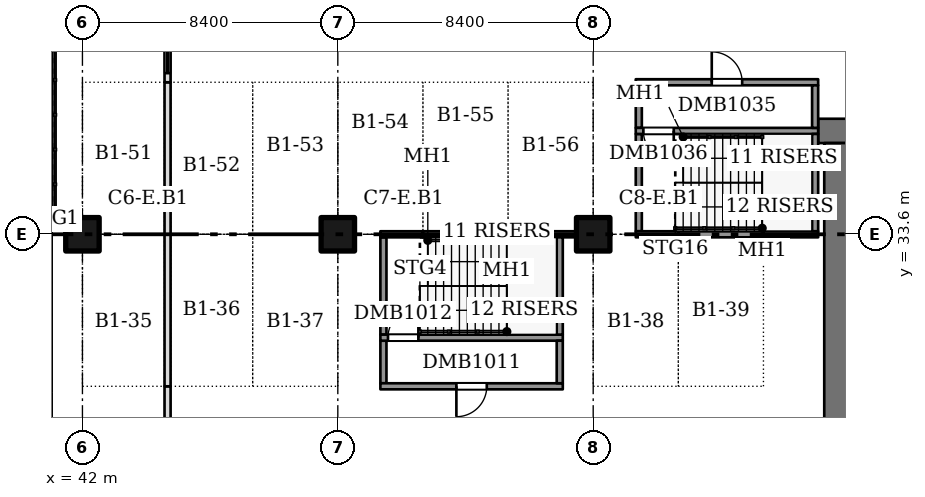
"""IFC4 building model, lengths in metres.
Left out: names, types, materials, properties, quantities, classifications, styles, units other than length and angle.
Written with IfcOpenShell. Run it as: python <this file> out.ifc"""

import sys

from ifc_helpers import new_model, si_unit, direction, frame, frame_2d, origin, origin_2d, place, context, subcontext, project, spatial, rectangle, extrude, element, fill, save


model = new_model("IFC4")
c1 = context("Model", 3, precision=1e-05, world=origin(), true_north=direction((0.0, 1.0)))
c2 = subcontext(c1, "Body", "Model", "MODEL_VIEW")
j1 = project(units=[si_unit("LENGTHUNIT", "METRE"), si_unit("PLANEANGLEUNIT", "RADIAN")], contexts=[c1])
p1 = place(None, origin())
s1 = spatial("IfcSite", under=j1, at=p1, CompositionType="ELEMENT")
p2 = place(p1, origin())
s2 = spatial("IfcBuilding", under=s1, at=p2, CompositionType="ELEMENT")
p3 = place(p2, frame((0.0, 0.0, -4.0)))
s3 = spatial("IfcBuildingStorey", under=s2, at=p3, CompositionType="ELEMENT", Elevation=-4.0)
p4 = place(p3, frame((66.2, 37.0, 0.0), z_axis=(0.0, 0.0, 1.0), x_axis=(1.0, 0.0, 0.0)))
e1 = element("IfcWall", 1, at=p4, inside=s3, PredefinedType="SOLIDWALL", context=c2, shape_type="SweptSolid", body=[
    extrude(rectangle(XDim=60.2, YDim=0.8, at=frame_2d((30.1, 0.0))), origin(), (0.0, 0.0, 1.0), 3.6),
])
p5 = place(p3, frame((66.8, 0.4, 0.0), z_axis=(0.0, 0.0, 1.0), x_axis=(0.0, 1.0, 0.0)))
e2 = element("IfcWall", 2, at=p5, inside=s3, PredefinedType="SOLIDWALL", context=c2, shape_type="SweptSolid", body=[
    extrude(rectangle(XDim=36.2, YDim=0.8, at=frame_2d((18.1, 0.0))), origin(), (0.0, 0.0, 1.0), 3.6),
])
for number, where, z_axis, x_axis in (
    (3, (42.0, 33.6, 0.0), (0.0, 0.0, 1.0), (1.0, 0.0, 0.0)),
    (4, (50.4, 33.6, 0.0), (0.0, 0.0, 1.0), (1.0, 0.0, 0.0)),
    (5, (58.8, 33.6, 0.0), (0.0, 0.0, 1.0), (1.0, 0.0, 0.0)),
):
    element("IfcColumn", number, at=place(p3, frame(where, z_axis=z_axis, x_axis=x_axis)), inside=s3, PredefinedType="COLUMN", context=c2, shape_type="SweptSolid", body=[
        extrude(rectangle(XDim=1.1, YDim=1.1, at=origin_2d()), origin(), (0.0, 0.0, 1.0), 3.6),
    ])
p6 = place(p3, frame((51.9, 28.7, 0.0), z_axis=(0.0, 0.0, 1.0), x_axis=(0.0, 1.0, 0.0)))
e6 = element("IfcWall", 6, at=p6, inside=s3, PredefinedType="SOLIDWALL", context=c2, shape_type="SweptSolid", body=[
    extrude(rectangle(XDim=1.4, YDim=0.2, at=frame_2d((0.7, 0.0))), origin(), (0.0, 0.0, 1.0), 4.0),
])
p7 = place(p3, frame((51.8, 28.6, 0.0), z_axis=(0.0, 0.0, 1.0), x_axis=(1.0, 0.0, 0.0)))
e7 = element("IfcWall", 7, at=p7, inside=s3, PredefinedType="SOLIDWALL", context=c2, shape_type="SweptSolid", body=[
    extrude(rectangle(XDim=6.0, YDim=0.2, at=frame_2d((3.0, 0.0))), origin(), (0.0, 0.0, 1.0), 4.0),
])
p8 = place(p7, frame((2.5, 0.0, 0.0)))
e8 = element("IfcOpeningElement", 8, at=p8, cuts=e7, PredefinedType="OPENING", context=c2, shape_type="SweptSolid", body=[
    extrude(rectangle(XDim=1.0, YDim=2.1, at=frame_2d((0.5, 1.05))), frame((0.0, 0.11, 0.0), z_axis=(0.0, -1.0, 0.0), x_axis=(1.0, 0.0, 0.0)), (0.0, 0.0, 1.0), 0.22),
])
p9 = place(p3, frame((51.9, 30.3, 0.0), z_axis=(0.0, 0.0, 1.0), x_axis=(0.0, 1.0, 0.0)))
e9 = element("IfcWall", 9, at=p9, inside=s3, PredefinedType="SOLIDWALL", context=c2, shape_type="SweptSolid", body=[
    extrude(rectangle(XDim=3.2, YDim=0.2, at=frame_2d((1.6, 0.0))), origin(), (0.0, 0.0, 1.0), 4.0),
])
p10 = place(p3, frame((51.8, 30.2, 0.0), z_axis=(0.0, 0.0, 1.0), x_axis=(1.0, 0.0, 0.0)))
e10 = element("IfcWall", 10, at=p10, inside=s3, PredefinedType="SOLIDWALL", context=c2, shape_type="SweptSolid", body=[
    extrude(rectangle(XDim=6.0, YDim=0.2, at=frame_2d((3.0, 0.0))), origin(), (0.0, 0.0, 1.0), 4.0),
])
p11 = place(p10, frame((0.25, 0.0, 0.0)))
e11 = element("IfcOpeningElement", 11, at=p11, cuts=e10, PredefinedType="OPENING", context=c2, shape_type="SweptSolid", body=[
    extrude(rectangle(XDim=1.0, YDim=2.1, at=frame_2d((0.5, 1.05))), frame((0.0, 0.11, 0.0), z_axis=(0.0, -1.0, 0.0), x_axis=(1.0, 0.0, 0.0)), (0.0, 0.0, 1.0), 0.22),
])
p12 = place(p3, frame((51.8, 33.6, 0.0), z_axis=(0.0, 0.0, 1.0), x_axis=(1.0, 0.0, 0.0)))
e12 = element("IfcWall", 12, at=p12, inside=s3, PredefinedType="SOLIDWALL", context=c2, shape_type="SweptSolid", body=[
    extrude(rectangle(XDim=1.4, YDim=0.2, at=frame_2d((0.7, 0.0))), origin(), (0.0, 0.0, 1.0), 4.0),
])
p13 = place(p3, frame((53.2, 33.6, 0.0), z_axis=(0.0, 0.0, 1.0), x_axis=(1.0, 0.0, 0.0)))
e13 = element("IfcWall", 13, at=p13, inside=s3, PredefinedType="SOLIDWALL", context=c2, shape_type="SweptSolid", body=[
    extrude(rectangle(XDim=2.8, YDim=0.2, at=frame_2d((1.4, 0.0))), origin(), (0.0, 0.0, 1.0), 4.0),
])
p14 = place(p3, frame((56.0, 33.6, 0.0), z_axis=(0.0, 0.0, 1.0), x_axis=(1.0, 0.0, 0.0)))
e14 = element("IfcWall", 14, at=p14, inside=s3, PredefinedType="SOLIDWALL", context=c2, shape_type="SweptSolid", body=[
    extrude(rectangle(XDim=2.25, YDim=0.2, at=frame_2d((1.125, 0.0))), origin(), (0.0, 0.0, 1.0), 4.0),
])
p15 = place(p3, frame((57.7, 28.7, 0.0), z_axis=(0.0, 0.0, 1.0), x_axis=(0.0, 1.0, 0.0)))
e15 = element("IfcWall", 15, at=p15, inside=s3, PredefinedType="SOLIDWALL", context=c2, shape_type="SweptSolid", body=[
    extrude(rectangle(XDim=1.4, YDim=0.2, at=frame_2d((0.7, 0.0))), origin(), (0.0, 0.0, 1.0), 4.0),
])
for number, where, z_axis, x_axis in (
    (16, (57.7, 30.3, 0.0), (0.0, 0.0, 1.0), (0.0, 1.0, 0.0)),
    (17, (60.3, 33.7, 0.0), (0.0, 0.0, 1.0), (0.0, 1.0, 0.0)),
):
    element("IfcWall", number, at=place(p3, frame(where, z_axis=z_axis, x_axis=x_axis)), inside=s3, PredefinedType="SOLIDWALL", context=c2, shape_type="SweptSolid", body=[
        extrude(rectangle(XDim=3.2, YDim=0.2, at=frame_2d((1.6, 0.0))), origin(), (0.0, 0.0, 1.0), 4.0),
    ])
p16 = place(p3, frame((60.2, 33.6, 0.0), z_axis=(0.0, 0.0, 1.0), x_axis=(1.0, 0.0, 0.0)))
e18 = element("IfcWall", 18, at=p16, inside=s3, PredefinedType="SOLIDWALL", context=c2, shape_type="SweptSolid", body=[
    extrude(rectangle(XDim=1.4, YDim=0.2, at=frame_2d((0.7, 0.0))), origin(), (0.0, 0.0, 1.0), 4.0),
])
p17 = place(p3, frame((60.3, 37.1, 0.0), z_axis=(0.0, 0.0, 1.0), x_axis=(0.0, 1.0, 0.0)))
e19 = element("IfcWall", 19, at=p17, inside=s3, PredefinedType="SOLIDWALL", context=c2, shape_type="SweptSolid", body=[
    extrude(rectangle(XDim=1.4, YDim=0.2, at=frame_2d((0.7, 0.0))), origin(), (0.0, 0.0, 1.0), 4.0),
])
p18 = place(p3, frame((60.2, 37.0, 0.0), z_axis=(0.0, 0.0, 1.0), x_axis=(1.0, 0.0, 0.0)))
e20 = element("IfcWall", 20, at=p18, inside=s3, PredefinedType="SOLIDWALL", context=c2, shape_type="SweptSolid", body=[
    extrude(rectangle(XDim=6.0, YDim=0.2, at=frame_2d((3.0, 0.0))), origin(), (0.0, 0.0, 1.0), 4.0),
])
p19 = place(p18, frame((0.25, 0.0, 0.0)))
e21 = element("IfcOpeningElement", 21, at=p19, cuts=e20, PredefinedType="OPENING", context=c2, shape_type="SweptSolid", body=[
    extrude(rectangle(XDim=1.0, YDim=2.1, at=frame_2d((0.5, 1.05))), frame((0.0, 0.11, 0.0), z_axis=(0.0, -1.0, 0.0), x_axis=(1.0, 0.0, 0.0)), (0.0, 0.0, 1.0), 0.22),
])
p20 = place(p3, frame((60.2, 38.6, 0.0), z_axis=(0.0, 0.0, 1.0), x_axis=(1.0, 0.0, 0.0)))
e22 = element("IfcWall", 22, at=p20, inside=s3, PredefinedType="SOLIDWALL", context=c2, shape_type="SweptSolid", body=[
    extrude(rectangle(XDim=6.0, YDim=0.2, at=frame_2d((3.0, 0.0))), origin(), (0.0, 0.0, 1.0), 4.0),
])
p21 = place(p20, frame((2.5, 0.0, 0.0)))
e23 = element("IfcOpeningElement", 23, at=p21, cuts=e22, PredefinedType="OPENING", context=c2, shape_type="SweptSolid", body=[
    extrude(rectangle(XDim=1.0, YDim=2.1, at=frame_2d((0.5, 1.05))), frame((0.0, 0.11, 0.0), z_axis=(0.0, -1.0, 0.0), x_axis=(1.0, 0.0, 0.0)), (0.0, 0.0, 1.0), 0.22),
])
p22 = place(p3, frame((61.6, 33.6, 0.0), z_axis=(0.0, 0.0, 1.0), x_axis=(1.0, 0.0, 0.0)))
e24 = element("IfcWall", 24, at=p22, inside=s3, PredefinedType="SOLIDWALL", context=c2, shape_type="SweptSolid", body=[
    extrude(rectangle(XDim=2.8, YDim=0.2, at=frame_2d((1.4, 0.0))), origin(), (0.0, 0.0, 1.0), 4.0),
])
p23 = place(p3, frame((64.4, 33.6, 0.0), z_axis=(0.0, 0.0, 1.0), x_axis=(1.0, 0.0, 0.0)))
e25 = element("IfcWall", 25, at=p23, inside=s3, PredefinedType="SOLIDWALL", context=c2, shape_type="SweptSolid", body=[
    extrude(rectangle(XDim=1.8, YDim=0.2, at=frame_2d((0.9, 0.0))), origin(), (0.0, 0.0, 1.0), 4.0),
])
p24 = place(p3, frame((66.1, 33.7, 0.0), z_axis=(0.0, 0.0, 1.0), x_axis=(0.0, 1.0, 0.0)))
e26 = element("IfcWall", 26, at=p24, inside=s3, PredefinedType="SOLIDWALL", context=c2, shape_type="SweptSolid", body=[
    extrude(rectangle(XDim=3.2, YDim=0.2, at=frame_2d((1.6, 0.0))), origin(), (0.0, 0.0, 1.0), 4.0),
])
p25 = place(p3, frame((66.1, 37.1, 0.0), z_axis=(0.0, 0.0, 1.0), x_axis=(0.0, 1.0, 0.0)))
e27 = element("IfcWall", 27, at=p25, inside=s3, PredefinedType="SOLIDWALL", context=c2, shape_type="SweptSolid", body=[
    extrude(rectangle(XDim=1.4, YDim=0.2, at=frame_2d((0.7, 0.0))), origin(), (0.0, 0.0, 1.0), 4.0),
])
p26 = place(p3, frame((44.8, 25.2, 0.0), z_axis=(0.0, 0.0, 1.0), x_axis=(0.0, 1.0, 0.0)))
e28 = element("IfcWall", 28, at=p26, inside=s3, PredefinedType="PARTITIONING", context=c2, shape_type="SweptSolid", body=[
    extrude(rectangle(XDim=3.4, YDim=0.2, at=frame_2d((1.7, 0.0))), origin(), (0.0, 0.0, 1.0), 3.6),
])
p27 = place(p3, frame((44.8, 28.6, 0.0), z_axis=(0.0, 0.0, 1.0), x_axis=(0.0, 1.0, 0.0)))
e29 = element("IfcWall", 29, at=p27, inside=s3, PredefinedType="PARTITIONING", context=c2, shape_type="SweptSolid", body=[
    extrude(rectangle(XDim=10.0, YDim=0.2, at=frame_2d((5.0, 0.0))), origin(), (0.0, 0.0, 1.0), 3.6),
])
p28 = place(p3, frame((44.8, 38.6, 0.0), z_axis=(0.0, 0.0, 1.0), x_axis=(0.0, 1.0, 0.0)))
e30 = element("IfcWall", 30, at=p28, inside=s3, PredefinedType="PARTITIONING", context=c2, shape_type="SweptSolid", body=[
    extrude(rectangle(XDim=6.8, YDim=0.2, at=frame_2d((3.4, 0.0))), origin(), (0.0, 0.0, 1.0), 3.6),
])
p29 = place(p28, frame((0.3, 0.0, 0.0)))
e31 = element("IfcOpeningElement", 31, at=p29, cuts=e30, PredefinedType="OPENING", context=c2, shape_type="SweptSolid", body=[
    extrude(rectangle(XDim=4.8, YDim=2.4, at=frame_2d((2.4, 1.2))), frame((0.0, 0.11, 0.0), z_axis=(0.0, -1.0, 0.0), x_axis=(1.0, 0.0, 0.0)), (0.0, 0.0, 1.0), 0.22),
])
p30 = place(p28, frame((5.4, 0.0, 0.0)))
e32 = element("IfcOpeningElement", 32, at=p30, cuts=e30, PredefinedType="OPENING", context=c2, shape_type="SweptSolid", body=[
    extrude(rectangle(XDim=1.0, YDim=2.1, at=frame_2d((0.5, 1.05))), frame((0.0, 0.11, 0.0), z_axis=(0.0, -1.0, 0.0), x_axis=(1.0, 0.0, 0.0)), (0.0, 0.0, 1.0), 0.22),
])
p31 = place(p8, frame((1.0, 0.0, 0.0), z_axis=(0.0, 0.0, 1.0), x_axis=(-1.0, 0.0, 0.0)))
e33 = element("IfcDoor", 33, at=p31, inside=s3, OperationType="SINGLE_SWING_RIGHT", PredefinedType="DOOR", context=c2, shape_type="SweptSolid", body=[
    extrude(rectangle(XDim=1.0, YDim=2.1, at=frame_2d((0.5, 1.05))), frame((0.0, 0.025, 0.0), z_axis=(0.0, -1.0, 0.0), x_axis=(1.0, 0.0, 0.0)), (0.0, 0.0, 1.0), 0.05),
])
fill(e8, e33)
p32 = place(p11, origin())
e34 = element("IfcDoor", 34, at=p32, inside=s3, OperationType="SINGLE_SWING_RIGHT", PredefinedType="DOOR", context=c2, shape_type="SweptSolid", body=[
    extrude(rectangle(XDim=1.0, YDim=2.1, at=frame_2d((0.5, 1.05))), frame((0.0, 0.025, 0.0), z_axis=(0.0, -1.0, 0.0), x_axis=(1.0, 0.0, 0.0)), (0.0, 0.0, 1.0), 0.05),
])
fill(e11, e34)
p33 = place(p21, origin())
e35 = element("IfcDoor", 35, at=p33, inside=s3, OperationType="SINGLE_SWING_LEFT", PredefinedType="DOOR", context=c2, shape_type="SweptSolid", body=[
    extrude(rectangle(XDim=1.0, YDim=2.1, at=frame_2d((0.5, 1.05))), frame((0.0, 0.025, 0.0), z_axis=(0.0, -1.0, 0.0), x_axis=(1.0, 0.0, 0.0)), (0.0, 0.0, 1.0), 0.05),
])
fill(e23, e35)
p34 = place(p19, frame((1.0, 0.0, 0.0), z_axis=(0.0, 0.0, 1.0), x_axis=(-1.0, 0.0, 0.0)))
e36 = element("IfcDoor", 36, at=p34, inside=s3, OperationType="SINGLE_SWING_LEFT", PredefinedType="DOOR", context=c2, shape_type="SweptSolid", body=[
    extrude(rectangle(XDim=1.0, YDim=2.1, at=frame_2d((0.5, 1.05))), frame((0.0, 0.025, 0.0), z_axis=(0.0, -1.0, 0.0), x_axis=(1.0, 0.0, 0.0)), (0.0, 0.0, 1.0), 0.05),
])
fill(e21, e36)
p35 = place(p29, origin())
e37 = element("IfcDoor", 37, at=p35, inside=s3, OperationType="ROLLINGUP", PredefinedType="GATE", context=c2, shape_type="SweptSolid", body=[
    extrude(rectangle(XDim=4.8, YDim=2.4, at=frame_2d((2.4, 1.2))), frame((0.0, 0.025, 0.0), z_axis=(0.0, -1.0, 0.0), x_axis=(1.0, 0.0, 0.0)), (0.0, 0.0, 1.0), 0.05),
])
fill(e31, e37)
save(model, sys.argv[1])
